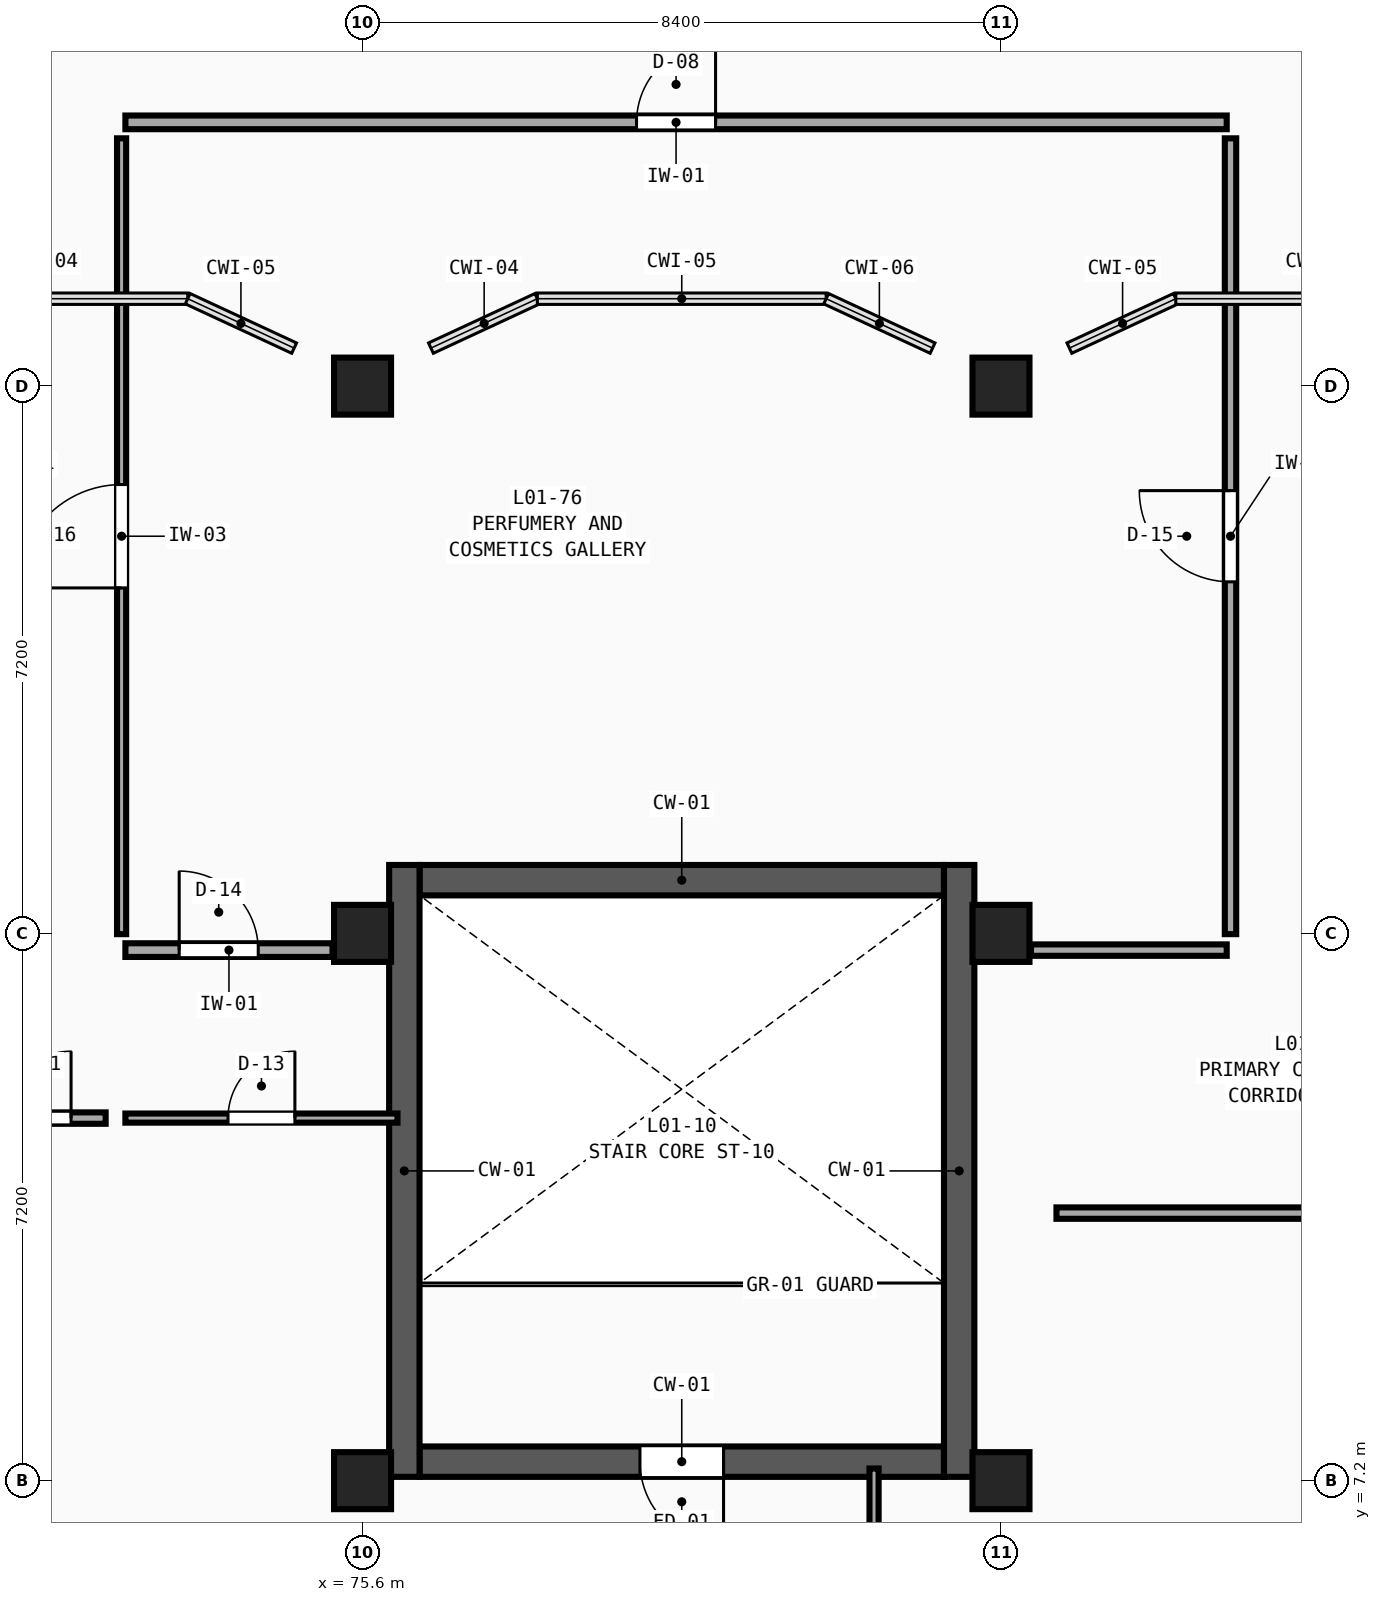
"""IFC4 building model, lengths in metres.
Left out: names, types, materials, properties, quantities, classifications, styles, units other than length and angle.
Written with IfcOpenShell. Run it as: python <this file> out.ifc"""

import sys

from ifc_helpers import new_model, si_unit, direction, frame, frame_2d, origin, origin_2d, place, context, subcontext, project, spatial, rectangle, extrude, element, fill, save


model = new_model("IFC4")
c1 = context("Model", 3, precision=1e-05, world=origin(), true_north=direction((0.0, 1.0)))
c2 = subcontext(c1, "Body", "Model", "MODEL_VIEW")
j1 = project(units=[si_unit("LENGTHUNIT", "METRE"), si_unit("PLANEANGLEUNIT", "RADIAN")], contexts=[c1])
p1 = place(None, origin())
s1 = spatial("IfcSite", under=j1, at=p1, CompositionType="ELEMENT")
p2 = place(p1, origin())
s2 = spatial("IfcBuilding", under=s1, at=p2, CompositionType="ELEMENT")
p3 = place(p2, frame((0.0, 0.0, 5.4)))
s3 = spatial("IfcBuildingStorey", under=s2, at=p3, CompositionType="ELEMENT", Elevation=5.4)
for number, where, z_axis, x_axis in (
    (1, (75.6, 7.2, 0.0), (0.0, 0.0, 1.0), (1.0, 0.0, 0.0)),
    (2, (75.6, 14.4, 0.0), (0.0, 0.0, 1.0), (1.0, 0.0, 0.0)),
    (3, (75.6, 21.6, 0.0), (0.0, 0.0, 1.0), (1.0, 0.0, 0.0)),
    (4, (84.0, 7.2, 0.0), (0.0, 0.0, 1.0), (1.0, 0.0, 0.0)),
    (5, (84.0, 14.4, 0.0), (0.0, 0.0, 1.0), (1.0, 0.0, 0.0)),
    (6, (84.0, 21.6, 0.0), (0.0, 0.0, 1.0), (1.0, 0.0, 0.0)),
):
    element("IfcColumn", number, at=place(p3, frame(where, z_axis=z_axis, x_axis=x_axis)), inside=s3, PredefinedType="COLUMN", context=c2, shape_type="SweptSolid", body=[
        extrude(rectangle(XDim=0.75, YDim=0.75, at=origin_2d()), origin(), (0.0, 0.0, 1.0), 4.5),
    ])
p4 = place(p3, frame((83.25, 7.45, 0.0), z_axis=(0.0, 0.0, 1.0), x_axis=(-1.0, 0.0, 0.0)))
e7 = element("IfcWall", 7, at=p4, inside=s3, PredefinedType="SHEAR", context=c2, shape_type="SweptSolid", body=[
    extrude(rectangle(XDim=6.9, YDim=0.4, at=frame_2d((3.45, 0.0))), origin(), (0.0, 0.0, 1.0), 4.5),
])
p5 = place(p4, frame((2.9, 0.0, 0.0)))
e8 = element("IfcOpeningElement", 8, at=p5, cuts=e7, PredefinedType="OPENING", context=c2, shape_type="SweptSolid", body=[
    extrude(rectangle(XDim=1.1, YDim=2.2, at=frame_2d((0.55, 1.1))), frame((0.0, 0.22, 0.0), z_axis=(0.0, -1.0, 0.0), x_axis=(1.0, 0.0, 0.0)), (0.0, 0.0, 1.0), 0.44),
])
p6 = place(p3, frame((76.35, 15.1, 0.0), z_axis=(0.0, 0.0, 1.0), x_axis=(1.0, 0.0, 0.0)))
e9 = element("IfcWall", 9, at=p6, inside=s3, PredefinedType="SHEAR", context=c2, shape_type="SweptSolid", body=[
    extrude(rectangle(XDim=6.9, YDim=0.4, at=frame_2d((3.45, 0.0))), origin(), (0.0, 0.0, 1.0), 4.5),
])
for number, where, z_axis, x_axis in (
    (10, (76.15, 15.3, 0.0), (0.0, 0.0, 1.0), (0.0, -1.0, 0.0)),
    (11, (83.45, 7.25, 0.0), (0.0, 0.0, 1.0), (0.0, 1.0, 0.0)),
):
    element("IfcWall", number, at=place(p3, frame(where, z_axis=z_axis, x_axis=x_axis)), inside=s3, PredefinedType="SHEAR", context=c2, shape_type="SweptSolid", body=[
        extrude(rectangle(XDim=8.05, YDim=0.4, at=frame_2d((4.025, 0.0))), origin(), (0.0, 0.0, 1.0), 4.5),
    ])
p7 = place(p3, frame((84.73, 10.72, 0.0), z_axis=(0.0, 0.0, 1.0), x_axis=(1.0, 0.0, 0.0)))
e12 = element("IfcWall", 12, at=p7, inside=s3, PredefinedType="PARTITIONING", context=c2, shape_type="SweptSolid", body=[
    extrude(rectangle(XDim=16.53, YDim=0.15, at=frame_2d((8.265, 0.0))), origin(), (0.0, 0.0, 1.0), 4.18),
])
p8 = place(p7, frame((7.665, 0.0, 0.0)))
e13 = element("IfcOpeningElement", 13, at=p8, cuts=e12, PredefinedType="OPENING", context=c2, shape_type="SweptSolid", body=[
    extrude(rectangle(XDim=1.2, YDim=2.05, at=frame_2d((0.6, 1.025))), frame((0.0, 0.095, 0.0), z_axis=(0.0, -1.0, 0.0), x_axis=(1.0, 0.0, 0.0)), (0.0, 0.0, 1.0), 0.19),
])
p9 = place(p3, frame((72.48, 25.07, 0.0), z_axis=(0.0, 0.0, 1.0), x_axis=(1.0, 0.0, 0.0)))
e14 = element("IfcWall", 14, at=p9, inside=s3, PredefinedType="PARTITIONING", context=c2, shape_type="SweptSolid", body=[
    extrude(rectangle(XDim=14.49, YDim=0.18, at=frame_2d((7.245, 0.0))), origin(), (0.0, 0.0, 1.0), 4.18),
])
p10 = place(p9, frame((6.725, 0.0, 0.0)))
e15 = element("IfcOpeningElement", 15, at=p10, cuts=e14, PredefinedType="OPENING", context=c2, shape_type="SweptSolid", body=[
    extrude(rectangle(XDim=1.04, YDim=2.13, at=frame_2d((0.52, 1.065))), frame((0.0, 0.11, 0.0), z_axis=(0.0, -1.0, 0.0), x_axis=(1.0, 0.0, 0.0)), (0.0, 0.0, 1.0), 0.22),
])
p11 = place(p3, frame((87.02, 14.39, 0.0), z_axis=(0.0, 0.0, 1.0), x_axis=(0.0, 1.0, 0.0)))
e16 = element("IfcWall", 16, at=p11, inside=s3, PredefinedType="PARTITIONING", context=c2, shape_type="SweptSolid", body=[
    extrude(rectangle(XDim=10.47, YDim=0.15, at=frame_2d((5.235, 0.0))), origin(), (0.0, 0.0, 1.0), 4.18),
])
p12 = place(p11, frame((4.635, 0.0, 0.0)))
e17 = element("IfcOpeningElement", 17, at=p12, cuts=e16, PredefinedType="OPENING", context=c2, shape_type="SweptSolid", body=[
    extrude(rectangle(XDim=1.2, YDim=2.21, at=frame_2d((0.6, 1.105))), frame((0.0, 0.095, 0.0), z_axis=(0.0, -1.0, 0.0), x_axis=(1.0, 0.0, 0.0)), (0.0, 0.0, 1.0), 0.19),
])
p13 = place(p3, frame((72.43, 14.39, 0.0), z_axis=(0.0, 0.0, 1.0), x_axis=(0.0, 1.0, 0.0)))
e18 = element("IfcWall", 18, at=p13, inside=s3, PredefinedType="PARTITIONING", context=c2, shape_type="SweptSolid", body=[
    extrude(rectangle(XDim=10.47, YDim=0.12, at=frame_2d((5.235, 0.0))), origin(), (0.0, 0.0, 1.0), 4.18),
])
p14 = place(p13, frame((4.555, 0.0, 0.0)))
e19 = element("IfcOpeningElement", 19, at=p14, cuts=e18, PredefinedType="OPENING", context=c2, shape_type="SweptSolid", body=[
    extrude(rectangle(XDim=1.36, YDim=2.21, at=frame_2d((0.68, 1.105))), frame((0.0, 0.08, 0.0), z_axis=(0.0, -1.0, 0.0), x_axis=(1.0, 0.0, 0.0)), (0.0, 0.0, 1.0), 0.16),
])
p15 = place(p3, frame((82.33, 0.37, 0.0), z_axis=(0.0, 0.0, 1.0), x_axis=(0.0, 1.0, 0.0)))
e20 = element("IfcWall", 20, at=p15, inside=s3, PredefinedType="PARTITIONING", context=c2, shape_type="SweptSolid", body=[
    extrude(rectangle(XDim=6.99, YDim=0.12, at=frame_2d((3.495, 0.0))), origin(), (0.0, 0.0, 1.0), 4.18),
])
p16 = place(p15, frame((3.055, 0.0, 0.0)))
e21 = element("IfcOpeningElement", 21, at=p16, cuts=e20, PredefinedType="OPENING", context=c2, shape_type="SweptSolid", body=[
    extrude(rectangle(XDim=0.88, YDim=2.45, at=frame_2d((0.44, 1.225))), frame((0.0, 0.08, 0.0), z_axis=(0.0, -1.0, 0.0), x_axis=(1.0, 0.0, 0.0)), (0.0, 0.0, 1.0), 0.16),
])
p17 = place(p3, frame((72.48, 11.97, 0.0), z_axis=(0.0, 0.0, 1.0), x_axis=(1.0, 0.0, 0.0)))
e22 = element("IfcWall", 22, at=p17, inside=s3, PredefinedType="PARTITIONING", context=c2, shape_type="SweptSolid", body=[
    extrude(rectangle(XDim=3.58, YDim=0.12, at=frame_2d((1.79, 0.0))), origin(), (0.0, 0.0, 1.0), 4.18),
])
p18 = place(p17, frame((1.35, 0.0, 0.0)))
e23 = element("IfcOpeningElement", 23, at=p18, cuts=e22, PredefinedType="OPENING", context=c2, shape_type="SweptSolid", body=[
    extrude(rectangle(XDim=0.88, YDim=2.21, at=frame_2d((0.44, 1.105))), frame((0.0, 0.08, 0.0), z_axis=(0.0, -1.0, 0.0), x_axis=(1.0, 0.0, 0.0)), (0.0, 0.0, 1.0), 0.16),
])
p19 = place(p3, frame((72.48, 14.18, 0.0), z_axis=(0.0, 0.0, 1.0), x_axis=(1.0, 0.0, 0.0)))
e24 = element("IfcWall", 24, at=p19, inside=s3, PredefinedType="PARTITIONING", context=c2, shape_type="SweptSolid", body=[
    extrude(rectangle(XDim=2.725, YDim=0.18, at=frame_2d((1.363, 0.0))), origin(), (0.0, 0.0, 1.0), 3.73),
])
p20 = place(p19, frame((0.708, 0.0, 0.0)))
e25 = element("IfcOpeningElement", 25, at=p20, cuts=e24, PredefinedType="OPENING", context=c2, shape_type="SweptSolid", body=[
    extrude(rectangle(XDim=1.04, YDim=2.21, at=frame_2d((0.52, 1.105))), frame((0.0, 0.11, 0.0), z_axis=(0.0, -1.0, 0.0), x_axis=(1.0, 0.0, 0.0)), (0.0, 0.0, 1.0), 0.22),
])
p21 = place(p3, frame((84.395, 14.18, 0.0), z_axis=(0.0, 0.0, 1.0), x_axis=(1.0, 0.0, 0.0)))
e26 = element("IfcWall", 26, at=p21, inside=s3, PredefinedType="PARTITIONING", context=c2, shape_type="SweptSolid", body=[
    extrude(rectangle(XDim=2.575, YDim=0.15, at=frame_2d((1.288, 0.0))), origin(), (0.0, 0.0, 1.0), 3.73),
])
p22 = place(p3, frame((70.43, 11.97, 0.0), z_axis=(0.0, 0.0, 1.0), x_axis=(1.0, 0.0, 0.0)))
e27 = element("IfcWall", 27, at=p22, inside=s3, PredefinedType="PARTITIONING", context=c2, shape_type="SweptSolid", body=[
    extrude(rectangle(XDim=1.79, YDim=0.15, at=frame_2d((0.895, 0.0))), origin(), (0.0, 0.0, 1.0), 4.18),
])
p23 = place(p22, frame((0.455, 0.0, 0.0)))
e28 = element("IfcOpeningElement", 28, at=p23, cuts=e27, PredefinedType="OPENING", context=c2, shape_type="SweptSolid", body=[
    extrude(rectangle(XDim=0.88, YDim=2.05, at=frame_2d((0.44, 1.025))), frame((0.0, 0.095, 0.0), z_axis=(0.0, -1.0, 0.0), x_axis=(1.0, 0.0, 0.0)), (0.0, 0.0, 1.0), 0.19),
])
p24 = place(p5, origin())
e29 = element("IfcDoor", 29, at=p24, inside=s3, OperationType="SINGLE_SWING_LEFT", PredefinedType="DOOR", context=c2, shape_type="SweptSolid", body=[
    extrude(rectangle(XDim=1.1, YDim=2.2, at=frame_2d((0.55, 1.1))), frame((0.0, 0.025, 0.0), z_axis=(0.0, -1.0, 0.0), x_axis=(1.0, 0.0, 0.0)), (0.0, 0.0, 1.0), 0.05),
])
fill(e8, e29)
p25 = place(p10, origin())
e30 = element("IfcDoor", 30, at=p25, inside=s3, OperationType="SINGLE_SWING_RIGHT", PredefinedType="DOOR", context=c2, shape_type="SweptSolid", body=[
    extrude(rectangle(XDim=1.04, YDim=2.13, at=frame_2d((0.52, 1.065))), frame((0.0, 0.025, 0.0), z_axis=(0.0, -1.0, 0.0), x_axis=(1.0, 0.0, 0.0)), (0.0, 0.0, 1.0), 0.05),
])
fill(e15, e30)
p26 = place(p12, origin())
e31 = element("IfcDoor", 31, at=p26, inside=s3, OperationType="SINGLE_SWING_RIGHT", PredefinedType="DOOR", context=c2, shape_type="SweptSolid", body=[
    extrude(rectangle(XDim=1.2, YDim=2.21, at=frame_2d((0.6, 1.105))), frame((0.0, 0.025, 0.0), z_axis=(0.0, -1.0, 0.0), x_axis=(1.0, 0.0, 0.0)), (0.0, 0.0, 1.0), 0.05),
])
fill(e17, e31)
p27 = place(p14, origin())
e32 = element("IfcDoor", 32, at=p27, inside=s3, OperationType="SINGLE_SWING_LEFT", PredefinedType="DOOR", context=c2, shape_type="SweptSolid", body=[
    extrude(rectangle(XDim=1.36, YDim=2.21, at=frame_2d((0.68, 1.105))), frame((0.0, 0.025, 0.0), z_axis=(0.0, -1.0, 0.0), x_axis=(1.0, 0.0, 0.0)), (0.0, 0.0, 1.0), 0.05),
])
fill(e19, e32)
p28 = place(p18, origin())
e33 = element("IfcDoor", 33, at=p28, inside=s3, OperationType="SINGLE_SWING_RIGHT", PredefinedType="DOOR", context=c2, shape_type="SweptSolid", body=[
    extrude(rectangle(XDim=0.88, YDim=2.21, at=frame_2d((0.44, 1.105))), frame((0.0, 0.025, 0.0), z_axis=(0.0, -1.0, 0.0), x_axis=(1.0, 0.0, 0.0)), (0.0, 0.0, 1.0), 0.05),
])
fill(e23, e33)
p29 = place(p20, origin())
e34 = element("IfcDoor", 34, at=p29, inside=s3, OperationType="SINGLE_SWING_LEFT", PredefinedType="DOOR", context=c2, shape_type="SweptSolid", body=[
    extrude(rectangle(XDim=1.04, YDim=2.21, at=frame_2d((0.52, 1.105))), frame((0.0, 0.025, 0.0), z_axis=(0.0, -1.0, 0.0), x_axis=(1.0, 0.0, 0.0)), (0.0, 0.0, 1.0), 0.05),
])
fill(e25, e34)
p30 = place(p23, origin())
e35 = element("IfcDoor", 35, at=p30, inside=s3, OperationType="SINGLE_SWING_RIGHT", PredefinedType="DOOR", context=c2, shape_type="SweptSolid", body=[
    extrude(rectangle(XDim=0.88, YDim=2.05, at=frame_2d((0.44, 1.025))), frame((0.0, 0.025, 0.0), z_axis=(0.0, -1.0, 0.0), x_axis=(1.0, 0.0, 0.0)), (0.0, 0.0, 1.0), 0.05),
])
fill(e28, e35)
save(model, sys.argv[1])
